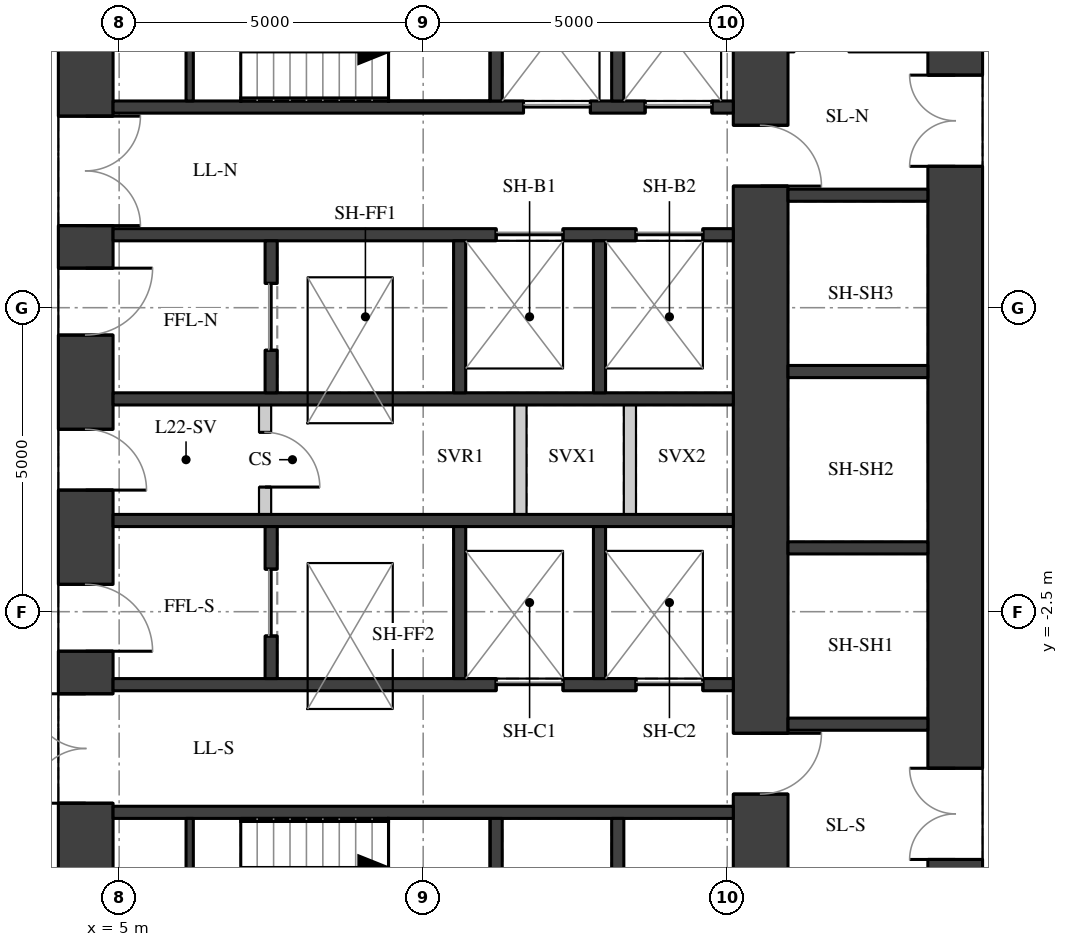
"""IFC4 building model, lengths in metres.
Left out: names, types, materials, properties, quantities, classifications, styles, units other than length and angle.
Written with IfcOpenShell. Run it as: python <this file> out.ifc"""

import sys

from ifc_helpers import new_model, si_unit, direction, frame, frame_2d, origin, place, context, subcontext, project, spatial, rectangle, extrude, element, fill, save


model = new_model("IFC4")
c1 = context("Model", 3, precision=1e-05, world=origin(), true_north=direction((0.0, 1.0)))
c2 = subcontext(c1, "Body", "Model", "MODEL_VIEW")
j1 = project(units=[si_unit("LENGTHUNIT", "METRE"), si_unit("PLANEANGLEUNIT", "RADIAN")], contexts=[c1])
p1 = place(None, origin())
s1 = spatial("IfcSite", under=j1, at=p1, CompositionType="ELEMENT")
p2 = place(p1, origin())
s2 = spatial("IfcBuilding", under=s1, at=p2, CompositionType="ELEMENT")
p3 = place(p2, frame((0.0, 0.0, 81.1)))
s3 = spatial("IfcBuildingStorey", under=s2, at=p3, CompositionType="ELEMENT", Elevation=81.1)
p4 = place(p3, frame((4.45, -11.1, 0.0), z_axis=(0.0, 0.0, 1.0), x_axis=(0.0, 1.0, 0.0)))
e1 = element("IfcWall", 1, at=p4, inside=s3, PredefinedType="SHEAR", context=c2, shape_type="SweptSolid", body=[
    extrude(rectangle(XDim=22.2, YDim=0.9, at=frame_2d((11.1, 0.0))), origin(), (0.0, 0.0, 1.0), 2.85),
])
p5 = place(p4, frame((2.35, 0.0, 0.0)))
e2 = element("IfcOpeningElement", 2, at=p5, cuts=e1, PredefinedType="OPENING", context=c2, shape_type="SweptSolid", body=[
    extrude(rectangle(XDim=1.5, YDim=2.1, at=frame_2d((0.75, 1.05))), frame((0.0, 0.46, 0.0), z_axis=(0.0, -1.0, 0.0), x_axis=(1.0, 0.0, 0.0)), (0.0, 0.0, 1.0), 0.92),
])
p6 = place(p4, frame((5.45, 0.0, 0.0)))
e3 = element("IfcOpeningElement", 3, at=p6, cuts=e1, PredefinedType="OPENING", context=c2, shape_type="SweptSolid", body=[
    extrude(rectangle(XDim=1.8, YDim=2.1, at=frame_2d((0.9, 1.05))), frame((0.0, 0.46, 0.0), z_axis=(0.0, -1.0, 0.0), x_axis=(1.0, 0.0, 0.0)), (0.0, 0.0, 1.0), 0.92),
])
p7 = place(p4, frame((7.95, 0.0, 0.0)))
e4 = element("IfcOpeningElement", 4, at=p7, cuts=e1, PredefinedType="OPENING", context=c2, shape_type="SweptSolid", body=[
    extrude(rectangle(XDim=1.1, YDim=2.1, at=frame_2d((0.55, 1.05))), frame((0.0, 0.46, 0.0), z_axis=(0.0, -1.0, 0.0), x_axis=(1.0, 0.0, 0.0)), (0.0, 0.0, 1.0), 0.92),
])
p8 = place(p4, frame((10.6, 0.0, 0.0)))
e5 = element("IfcOpeningElement", 5, at=p8, cuts=e1, PredefinedType="OPENING", context=c2, shape_type="SweptSolid", body=[
    extrude(rectangle(XDim=1.0, YDim=2.1, at=frame_2d((0.5, 1.05))), frame((0.0, 0.46, 0.0), z_axis=(0.0, -1.0, 0.0), x_axis=(1.0, 0.0, 0.0)), (0.0, 0.0, 1.0), 0.92),
])
p9 = place(p4, frame((13.15, 0.0, 0.0)))
e6 = element("IfcOpeningElement", 6, at=p9, cuts=e1, PredefinedType="OPENING", context=c2, shape_type="SweptSolid", body=[
    extrude(rectangle(XDim=1.1, YDim=2.1, at=frame_2d((0.55, 1.05))), frame((0.0, 0.46, 0.0), z_axis=(0.0, -1.0, 0.0), x_axis=(1.0, 0.0, 0.0)), (0.0, 0.0, 1.0), 0.92),
])
p10 = place(p4, frame((14.95, 0.0, 0.0)))
e7 = element("IfcOpeningElement", 7, at=p10, cuts=e1, PredefinedType="OPENING", context=c2, shape_type="SweptSolid", body=[
    extrude(rectangle(XDim=1.8, YDim=2.1, at=frame_2d((0.9, 1.05))), frame((0.0, 0.46, 0.0), z_axis=(0.0, -1.0, 0.0), x_axis=(1.0, 0.0, 0.0)), (0.0, 0.0, 1.0), 0.92),
])
p11 = place(p4, frame((18.35, 0.0, 0.0)))
e8 = element("IfcOpeningElement", 8, at=p11, cuts=e1, PredefinedType="OPENING", context=c2, shape_type="SweptSolid", body=[
    extrude(rectangle(XDim=1.5, YDim=2.1, at=frame_2d((0.75, 1.05))), frame((0.0, 0.46, 0.0), z_axis=(0.0, -1.0, 0.0), x_axis=(1.0, 0.0, 0.0)), (0.0, 0.0, 1.0), 0.92),
])
p12 = place(p3, frame((18.75, -11.1, 0.0), z_axis=(0.0, 0.0, 1.0), x_axis=(0.0, 1.0, 0.0)))
e9 = element("IfcWall", 9, at=p12, inside=s3, PredefinedType="SHEAR", context=c2, shape_type="SweptSolid", body=[
    extrude(rectangle(XDim=22.2, YDim=0.9, at=frame_2d((11.1, 0.0))), origin(), (0.0, 0.0, 1.0), 2.85),
])
p13 = place(p12, frame((15.925, 0.0, 0.0)))
e10 = element("IfcOpeningElement", 10, at=p13, cuts=e9, PredefinedType="OPENING", context=c2, shape_type="SweptSolid", body=[
    extrude(rectangle(XDim=1.5, YDim=2.1, at=frame_2d((0.75, 1.05))), frame((0.0, 0.46, 0.0), z_axis=(0.0, -1.0, 0.0), x_axis=(1.0, 0.0, 0.0)), (0.0, 0.0, 1.0), 0.92),
])
p14 = place(p12, frame((4.525, 0.0, 0.0)))
e11 = element("IfcOpeningElement", 11, at=p14, cuts=e9, PredefinedType="OPENING", context=c2, shape_type="SweptSolid", body=[
    extrude(rectangle(XDim=1.5, YDim=2.1, at=frame_2d((0.75, 1.05))), frame((0.0, 0.46, 0.0), z_axis=(0.0, -1.0, 0.0), x_axis=(1.0, 0.0, 0.0)), (0.0, 0.0, 1.0), 0.92),
])
p15 = place(p3, frame((15.55, -11.1, 0.0), z_axis=(0.0, 0.0, 1.0), x_axis=(0.0, 1.0, 0.0)))
e12 = element("IfcWall", 12, at=p15, inside=s3, PredefinedType="SHEAR", context=c2, shape_type="SweptSolid", body=[
    extrude(rectangle(XDim=22.2, YDim=0.9, at=frame_2d((11.1, 0.0))), origin(), (0.0, 0.0, 1.0), 2.85),
])
p16 = place(p15, frame((15.6, 0.0, 0.0)))
e13 = element("IfcOpeningElement", 13, at=p16, cuts=e12, PredefinedType="OPENING", context=c2, shape_type="SweptSolid", body=[
    extrude(rectangle(XDim=1.0, YDim=2.1, at=frame_2d((0.5, 1.05))), frame((0.0, 0.46, 0.0), z_axis=(0.0, -1.0, 0.0), x_axis=(1.0, 0.0, 0.0)), (0.0, 0.0, 1.0), 0.92),
])
p17 = place(p15, frame((5.6, 0.0, 0.0)))
e14 = element("IfcOpeningElement", 14, at=p17, cuts=e12, PredefinedType="OPENING", context=c2, shape_type="SweptSolid", body=[
    extrude(rectangle(XDim=1.0, YDim=2.1, at=frame_2d((0.5, 1.05))), frame((0.0, 0.46, 0.0), z_axis=(0.0, -1.0, 0.0), x_axis=(1.0, 0.0, 0.0)), (0.0, 0.0, 1.0), 0.92),
])
p18 = place(p3, frame((4.9, 5.8, 0.0), z_axis=(0.0, 0.0, 1.0), x_axis=(1.0, 0.0, 0.0)))
e15 = element("IfcWall", 15, at=p18, inside=s3, PredefinedType="SHEAR", context=c2, shape_type="SweptSolid", body=[
    extrude(rectangle(XDim=10.2, YDim=0.2, at=frame_2d((5.1, 0.0))), origin(), (0.0, 0.0, 1.0), 2.85),
])
p19 = place(p18, frame((6.75, 0.0, 0.0)))
e16 = element("IfcOpeningElement", 16, at=p19, cuts=e15, PredefinedType="OPENING", context=c2, shape_type="SweptSolid", body=[
    extrude(rectangle(XDim=1.1, YDim=2.1, at=frame_2d((0.55, 1.05))), frame((0.0, 0.11, 0.0), z_axis=(0.0, -1.0, 0.0), x_axis=(1.0, 0.0, 0.0)), (0.0, 0.0, 1.0), 0.22),
])
p20 = place(p18, frame((8.75, 0.0, 0.0)))
e17 = element("IfcOpeningElement", 17, at=p20, cuts=e15, PredefinedType="OPENING", context=c2, shape_type="SweptSolid", body=[
    extrude(rectangle(XDim=1.1, YDim=2.1, at=frame_2d((0.55, 1.05))), frame((0.0, 0.11, 0.0), z_axis=(0.0, -1.0, 0.0), x_axis=(1.0, 0.0, 0.0)), (0.0, 0.0, 1.0), 0.22),
])
p21 = place(p3, frame((4.9, 3.7, 0.0), z_axis=(0.0, 0.0, 1.0), x_axis=(1.0, 0.0, 0.0)))
e18 = element("IfcWall", 18, at=p21, inside=s3, PredefinedType="SHEAR", context=c2, shape_type="SweptSolid", body=[
    extrude(rectangle(XDim=10.2, YDim=0.2, at=frame_2d((5.1, 0.0))), origin(), (0.0, 0.0, 1.0), 2.85),
])
p22 = place(p21, frame((6.3, 0.0, 0.0)))
e19 = element("IfcOpeningElement", 19, at=p22, cuts=e18, PredefinedType="OPENING", context=c2, shape_type="SweptSolid", body=[
    extrude(rectangle(XDim=1.1, YDim=2.1, at=frame_2d((0.55, 1.05))), frame((0.0, 0.11, 0.0), z_axis=(0.0, -1.0, 0.0), x_axis=(1.0, 0.0, 0.0)), (0.0, 0.0, 1.0), 0.22),
])
p23 = place(p21, frame((8.6, 0.0, 0.0)))
e20 = element("IfcOpeningElement", 20, at=p23, cuts=e18, PredefinedType="OPENING", context=c2, shape_type="SweptSolid", body=[
    extrude(rectangle(XDim=1.1, YDim=2.1, at=frame_2d((0.55, 1.05))), frame((0.0, 0.11, 0.0), z_axis=(0.0, -1.0, 0.0), x_axis=(1.0, 0.0, 0.0)), (0.0, 0.0, 1.0), 0.22),
])
for number, where, z_axis, x_axis in (
    (21, (4.9, 1.0, 0.0), (0.0, 0.0, 1.0), (1.0, 0.0, 0.0)),
    (22, (4.9, -1.0, 0.0), (0.0, 0.0, 1.0), (1.0, 0.0, 0.0)),
):
    element("IfcWall", number, at=place(p3, frame(where, z_axis=z_axis, x_axis=x_axis)), inside=s3, PredefinedType="SHEAR", context=c2, shape_type="SweptSolid", body=[
        extrude(rectangle(XDim=10.2, YDim=0.2, at=frame_2d((5.1, 0.0))), origin(), (0.0, 0.0, 1.0), 2.85),
    ])
p24 = place(p3, frame((4.9, -3.7, 0.0), z_axis=(0.0, 0.0, 1.0), x_axis=(1.0, 0.0, 0.0)))
e23 = element("IfcWall", 23, at=p24, inside=s3, PredefinedType="SHEAR", context=c2, shape_type="SweptSolid", body=[
    extrude(rectangle(XDim=10.2, YDim=0.2, at=frame_2d((5.1, 0.0))), origin(), (0.0, 0.0, 1.0), 2.85),
])
p25 = place(p24, frame((6.3, 0.0, 0.0)))
e24 = element("IfcOpeningElement", 24, at=p25, cuts=e23, PredefinedType="OPENING", context=c2, shape_type="SweptSolid", body=[
    extrude(rectangle(XDim=1.1, YDim=2.1, at=frame_2d((0.55, 1.05))), frame((0.0, 0.11, 0.0), z_axis=(0.0, -1.0, 0.0), x_axis=(1.0, 0.0, 0.0)), (0.0, 0.0, 1.0), 0.22),
])
p26 = place(p24, frame((8.6, 0.0, 0.0)))
e25 = element("IfcOpeningElement", 25, at=p26, cuts=e23, PredefinedType="OPENING", context=c2, shape_type="SweptSolid", body=[
    extrude(rectangle(XDim=1.1, YDim=2.1, at=frame_2d((0.55, 1.05))), frame((0.0, 0.11, 0.0), z_axis=(0.0, -1.0, 0.0), x_axis=(1.0, 0.0, 0.0)), (0.0, 0.0, 1.0), 0.22),
])
p27 = place(p3, frame((4.9, -5.8, 0.0), z_axis=(0.0, 0.0, 1.0), x_axis=(1.0, 0.0, 0.0)))
e26 = element("IfcWall", 26, at=p27, inside=s3, PredefinedType="SHEAR", context=c2, shape_type="SweptSolid", body=[
    extrude(rectangle(XDim=10.2, YDim=0.2, at=frame_2d((5.1, 0.0))), origin(), (0.0, 0.0, 1.0), 2.85),
])
for number, where, z_axis, x_axis in (
    (27, (11.2, 5.9, 0.0), (0.0, 0.0, 1.0), (0.0, 1.0, 0.0)),
    (28, (11.2, -9.1, 0.0), (0.0, 0.0, 1.0), (0.0, 1.0, 0.0)),
    (29, (13.2, 5.9, 0.0), (0.0, 0.0, 1.0), (0.0, 1.0, 0.0)),
    (30, (13.2, -9.1, 0.0), (0.0, 0.0, 1.0), (0.0, 1.0, 0.0)),
):
    element("IfcWall", number, at=place(p3, frame(where, z_axis=z_axis, x_axis=x_axis)), inside=s3, PredefinedType="SHEAR", context=c2, shape_type="SweptSolid", body=[
        extrude(rectangle(XDim=3.2, YDim=0.2, at=frame_2d((1.6, 0.0))), origin(), (0.0, 0.0, 1.0), 2.85),
    ])
p28 = place(p3, frame((7.5, 1.1, 0.0), z_axis=(0.0, 0.0, 1.0), x_axis=(0.0, 1.0, 0.0)))
e31 = element("IfcWall", 31, at=p28, inside=s3, PredefinedType="SHEAR", context=c2, shape_type="SweptSolid", body=[
    extrude(rectangle(XDim=2.5, YDim=0.2, at=frame_2d((1.25, 0.0))), origin(), (0.0, 0.0, 1.0), 2.85),
])
p29 = place(p28, frame((0.7, 0.0, 0.0)))
e32 = element("IfcOpeningElement", 32, at=p29, cuts=e31, PredefinedType="OPENING", context=c2, shape_type="SweptSolid", body=[
    extrude(rectangle(XDim=1.1, YDim=2.1, at=frame_2d((0.55, 1.05))), frame((0.0, 0.11, 0.0), z_axis=(0.0, -1.0, 0.0), x_axis=(1.0, 0.0, 0.0)), (0.0, 0.0, 1.0), 0.22),
])
p30 = place(p3, frame((7.5, -3.6, 0.0), z_axis=(0.0, 0.0, 1.0), x_axis=(0.0, 1.0, 0.0)))
e33 = element("IfcWall", 33, at=p30, inside=s3, PredefinedType="SHEAR", context=c2, shape_type="SweptSolid", body=[
    extrude(rectangle(XDim=2.5, YDim=0.2, at=frame_2d((1.25, 0.0))), origin(), (0.0, 0.0, 1.0), 2.85),
])
p31 = place(p30, frame((0.7, 0.0, 0.0)))
e34 = element("IfcOpeningElement", 34, at=p31, cuts=e33, PredefinedType="OPENING", context=c2, shape_type="SweptSolid", body=[
    extrude(rectangle(XDim=1.1, YDim=2.1, at=frame_2d((0.55, 1.05))), frame((0.0, 0.11, 0.0), z_axis=(0.0, -1.0, 0.0), x_axis=(1.0, 0.0, 0.0)), (0.0, 0.0, 1.0), 0.22),
])
for number, where, z_axis, x_axis in (
    (35, (10.6, 1.1, 0.0), (0.0, 0.0, 1.0), (0.0, 1.0, 0.0)),
    (36, (10.6, -3.6, 0.0), (0.0, 0.0, 1.0), (0.0, 1.0, 0.0)),
    (37, (12.9, 1.1, 0.0), (0.0, 0.0, 1.0), (0.0, 1.0, 0.0)),
    (38, (12.9, -3.6, 0.0), (0.0, 0.0, 1.0), (0.0, 1.0, 0.0)),
):
    element("IfcWall", number, at=place(p3, frame(where, z_axis=z_axis, x_axis=x_axis)), inside=s3, PredefinedType="SHEAR", context=c2, shape_type="SweptSolid", body=[
        extrude(rectangle(XDim=2.5, YDim=0.2, at=frame_2d((1.25, 0.0))), origin(), (0.0, 0.0, 1.0), 2.85),
    ])
p32 = place(p3, frame((6.16, 5.9, 0.0), z_axis=(0.0, 0.0, 1.0), x_axis=(0.0, 1.0, 0.0)))
e39 = element("IfcWall", 39, at=p32, inside=s3, PredefinedType="SHEAR", context=c2, shape_type="SweptSolid", body=[
    extrude(rectangle(XDim=3.2, YDim=0.12, at=frame_2d((1.6, 0.0))), origin(), (0.0, 0.0, 1.0), 2.85),
])
p33 = place(p32, frame((0.85, 0.0, 0.0)))
e40 = element("IfcOpeningElement", 40, at=p33, cuts=e39, PredefinedType="OPENING", context=c2, shape_type="SweptSolid", body=[
    extrude(rectangle(XDim=1.5, YDim=2.1, at=frame_2d((0.75, 1.05))), frame((0.0, 0.07, 0.0), z_axis=(0.0, -1.0, 0.0), x_axis=(1.0, 0.0, 0.0)), (0.0, 0.0, 1.0), 0.14),
])
p34 = place(p3, frame((6.16, -9.1, 0.0), z_axis=(0.0, 0.0, 1.0), x_axis=(0.0, 1.0, 0.0)))
e41 = element("IfcWall", 41, at=p34, inside=s3, PredefinedType="SHEAR", context=c2, shape_type="SweptSolid", body=[
    extrude(rectangle(XDim=3.2, YDim=0.12, at=frame_2d((1.6, 0.0))), origin(), (0.0, 0.0, 1.0), 2.85),
])
p35 = place(p34, frame((0.85, 0.0, 0.0)))
e42 = element("IfcOpeningElement", 42, at=p35, cuts=e41, PredefinedType="OPENING", context=c2, shape_type="SweptSolid", body=[
    extrude(rectangle(XDim=1.5, YDim=2.1, at=frame_2d((0.75, 1.05))), frame((0.0, 0.07, 0.0), z_axis=(0.0, -1.0, 0.0), x_axis=(1.0, 0.0, 0.0)), (0.0, 0.0, 1.0), 0.14),
])
p36 = place(p3, frame((7.4, -0.9, 0.0), z_axis=(0.0, 0.0, 1.0), x_axis=(0.0, 1.0, 0.0)))
e43 = element("IfcWall", 43, at=p36, inside=s3, PredefinedType="PARTITIONING", context=c2, shape_type="SweptSolid", body=[
    extrude(rectangle(XDim=1.8, YDim=0.2, at=frame_2d((0.9, 0.0))), origin(), (0.0, 0.0, 1.0), 2.85),
])
p37 = place(p36, frame((0.45, 0.0, 0.0)))
e44 = element("IfcOpeningElement", 44, at=p37, cuts=e43, PredefinedType="OPENING", context=c2, shape_type="SweptSolid", body=[
    extrude(rectangle(XDim=0.9, YDim=2.1, at=frame_2d((0.45, 1.05))), frame((0.0, 0.11, 0.0), z_axis=(0.0, -1.0, 0.0), x_axis=(1.0, 0.0, 0.0)), (0.0, 0.0, 1.0), 0.22),
])
for number, where, z_axis, x_axis in (
    (45, (11.6, -0.9, 0.0), (0.0, 0.0, 1.0), (0.0, 1.0, 0.0)),
    (46, (13.4, -0.9, 0.0), (0.0, 0.0, 1.0), (0.0, 1.0, 0.0)),
):
    element("IfcWall", number, at=place(p3, frame(where, z_axis=z_axis, x_axis=x_axis)), inside=s3, PredefinedType="PARTITIONING", context=c2, shape_type="SweptSolid", body=[
        extrude(rectangle(XDim=1.8, YDim=0.2, at=frame_2d((0.9, 0.0))), origin(), (0.0, 0.0, 1.0), 2.85),
    ])
for number, where, z_axis, x_axis in (
    (47, (16.0, -4.35, 0.0), (0.0, 0.0, 1.0), (1.0, 0.0, 0.0)),
    (48, (16.0, -1.45, 0.0), (0.0, 0.0, 1.0), (1.0, 0.0, 0.0)),
    (49, (16.0, 1.45, 0.0), (0.0, 0.0, 1.0), (1.0, 0.0, 0.0)),
    (50, (16.0, 4.35, 0.0), (0.0, 0.0, 1.0), (1.0, 0.0, 0.0)),
):
    element("IfcWall", number, at=place(p3, frame(where, z_axis=z_axis, x_axis=x_axis)), inside=s3, PredefinedType="SHEAR", context=c2, shape_type="SweptSolid", body=[
        extrude(rectangle(XDim=2.3, YDim=0.2, at=frame_2d((1.15, 0.0))), origin(), (0.0, 0.0, 1.0), 2.85),
    ])
p38 = place(p6, origin())
e51 = element("IfcDoor", 51, at=p38, inside=s3, OperationType="DOUBLE_DOOR_SINGLE_SWING", PredefinedType="DOOR", context=c2, shape_type="SweptSolid", body=[
    extrude(rectangle(XDim=1.8, YDim=2.1, at=frame_2d((0.9, 1.05))), frame((0.0, 0.025, 0.0), z_axis=(0.0, -1.0, 0.0), x_axis=(1.0, 0.0, 0.0)), (0.0, 0.0, 1.0), 0.05),
])
fill(e3, e51)
p39 = place(p7, origin())
e52 = element("IfcDoor", 52, at=p39, inside=s3, OperationType="SINGLE_SWING_RIGHT", PredefinedType="DOOR", context=c2, shape_type="SweptSolid", body=[
    extrude(rectangle(XDim=1.1, YDim=2.1, at=frame_2d((0.55, 1.05))), frame((0.0, 0.025, 0.0), z_axis=(0.0, -1.0, 0.0), x_axis=(1.0, 0.0, 0.0)), (0.0, 0.0, 1.0), 0.05),
])
fill(e4, e52)
p40 = place(p8, origin())
e53 = element("IfcDoor", 53, at=p40, inside=s3, OperationType="SINGLE_SWING_RIGHT", PredefinedType="DOOR", context=c2, shape_type="SweptSolid", body=[
    extrude(rectangle(XDim=1.0, YDim=2.1, at=frame_2d((0.5, 1.05))), frame((0.0, 0.025, 0.0), z_axis=(0.0, -1.0, 0.0), x_axis=(1.0, 0.0, 0.0)), (0.0, 0.0, 1.0), 0.05),
])
fill(e5, e53)
p41 = place(p9, origin())
e54 = element("IfcDoor", 54, at=p41, inside=s3, OperationType="SINGLE_SWING_LEFT", PredefinedType="DOOR", context=c2, shape_type="SweptSolid", body=[
    extrude(rectangle(XDim=1.1, YDim=2.1, at=frame_2d((0.55, 1.05))), frame((0.0, 0.025, 0.0), z_axis=(0.0, -1.0, 0.0), x_axis=(1.0, 0.0, 0.0)), (0.0, 0.0, 1.0), 0.05),
])
fill(e6, e54)
p42 = place(p10, origin())
e55 = element("IfcDoor", 55, at=p42, inside=s3, OperationType="DOUBLE_DOOR_SINGLE_SWING", PredefinedType="DOOR", context=c2, shape_type="SweptSolid", body=[
    extrude(rectangle(XDim=1.8, YDim=2.1, at=frame_2d((0.9, 1.05))), frame((0.0, 0.025, 0.0), z_axis=(0.0, -1.0, 0.0), x_axis=(1.0, 0.0, 0.0)), (0.0, 0.0, 1.0), 0.05),
])
fill(e7, e55)
p43 = place(p13, origin())
e56 = element("IfcDoor", 56, at=p43, inside=s3, OperationType="DOUBLE_DOOR_SINGLE_SWING", PredefinedType="DOOR", context=c2, shape_type="SweptSolid", body=[
    extrude(rectangle(XDim=1.5, YDim=2.1, at=frame_2d((0.75, 1.05))), frame((0.0, 0.025, 0.0), z_axis=(0.0, -1.0, 0.0), x_axis=(1.0, 0.0, 0.0)), (0.0, 0.0, 1.0), 0.05),
])
fill(e10, e56)
p44 = place(p14, origin())
e57 = element("IfcDoor", 57, at=p44, inside=s3, OperationType="DOUBLE_DOOR_SINGLE_SWING", PredefinedType="DOOR", context=c2, shape_type="SweptSolid", body=[
    extrude(rectangle(XDim=1.5, YDim=2.1, at=frame_2d((0.75, 1.05))), frame((0.0, 0.025, 0.0), z_axis=(0.0, -1.0, 0.0), x_axis=(1.0, 0.0, 0.0)), (0.0, 0.0, 1.0), 0.05),
])
fill(e11, e57)
p45 = place(p19, origin())
e58 = element("IfcDoor", 58, at=p45, inside=s3, OperationType="DOUBLE_DOOR_SLIDING", PredefinedType="DOOR", context=c2, shape_type="SweptSolid", body=[
    extrude(rectangle(XDim=1.1, YDim=2.1, at=frame_2d((0.55, 1.05))), frame((0.0, 0.025, 0.0), z_axis=(0.0, -1.0, 0.0), x_axis=(1.0, 0.0, 0.0)), (0.0, 0.0, 1.0), 0.05),
])
fill(e16, e58)
p46 = place(p20, origin())
e59 = element("IfcDoor", 59, at=p46, inside=s3, OperationType="DOUBLE_DOOR_SLIDING", PredefinedType="DOOR", context=c2, shape_type="SweptSolid", body=[
    extrude(rectangle(XDim=1.1, YDim=2.1, at=frame_2d((0.55, 1.05))), frame((0.0, 0.025, 0.0), z_axis=(0.0, -1.0, 0.0), x_axis=(1.0, 0.0, 0.0)), (0.0, 0.0, 1.0), 0.05),
])
fill(e17, e59)
p47 = place(p22, origin())
e60 = element("IfcDoor", 60, at=p47, inside=s3, OperationType="DOUBLE_DOOR_SLIDING", PredefinedType="DOOR", context=c2, shape_type="SweptSolid", body=[
    extrude(rectangle(XDim=1.1, YDim=2.1, at=frame_2d((0.55, 1.05))), frame((0.0, 0.025, 0.0), z_axis=(0.0, -1.0, 0.0), x_axis=(1.0, 0.0, 0.0)), (0.0, 0.0, 1.0), 0.05),
])
fill(e19, e60)
p48 = place(p23, origin())
e61 = element("IfcDoor", 61, at=p48, inside=s3, OperationType="DOUBLE_DOOR_SLIDING", PredefinedType="DOOR", context=c2, shape_type="SweptSolid", body=[
    extrude(rectangle(XDim=1.1, YDim=2.1, at=frame_2d((0.55, 1.05))), frame((0.0, 0.025, 0.0), z_axis=(0.0, -1.0, 0.0), x_axis=(1.0, 0.0, 0.0)), (0.0, 0.0, 1.0), 0.05),
])
fill(e20, e61)
p49 = place(p25, origin())
e62 = element("IfcDoor", 62, at=p49, inside=s3, OperationType="DOUBLE_DOOR_SLIDING", PredefinedType="DOOR", context=c2, shape_type="SweptSolid", body=[
    extrude(rectangle(XDim=1.1, YDim=2.1, at=frame_2d((0.55, 1.05))), frame((0.0, 0.025, 0.0), z_axis=(0.0, -1.0, 0.0), x_axis=(1.0, 0.0, 0.0)), (0.0, 0.0, 1.0), 0.05),
])
fill(e24, e62)
p50 = place(p26, origin())
e63 = element("IfcDoor", 63, at=p50, inside=s3, OperationType="DOUBLE_DOOR_SLIDING", PredefinedType="DOOR", context=c2, shape_type="SweptSolid", body=[
    extrude(rectangle(XDim=1.1, YDim=2.1, at=frame_2d((0.55, 1.05))), frame((0.0, 0.025, 0.0), z_axis=(0.0, -1.0, 0.0), x_axis=(1.0, 0.0, 0.0)), (0.0, 0.0, 1.0), 0.05),
])
fill(e25, e63)
p51 = place(p29, origin())
e64 = element("IfcDoor", 64, at=p51, inside=s3, OperationType="DOUBLE_DOOR_SLIDING", PredefinedType="DOOR", context=c2, shape_type="SweptSolid", body=[
    extrude(rectangle(XDim=1.1, YDim=2.1, at=frame_2d((0.55, 1.05))), frame((0.0, 0.025, 0.0), z_axis=(0.0, -1.0, 0.0), x_axis=(1.0, 0.0, 0.0)), (0.0, 0.0, 1.0), 0.05),
])
fill(e32, e64)
p52 = place(p31, origin())
e65 = element("IfcDoor", 65, at=p52, inside=s3, OperationType="DOUBLE_DOOR_SLIDING", PredefinedType="DOOR", context=c2, shape_type="SweptSolid", body=[
    extrude(rectangle(XDim=1.1, YDim=2.1, at=frame_2d((0.55, 1.05))), frame((0.0, 0.025, 0.0), z_axis=(0.0, -1.0, 0.0), x_axis=(1.0, 0.0, 0.0)), (0.0, 0.0, 1.0), 0.05),
])
fill(e34, e65)
p53 = place(p37, origin())
e66 = element("IfcDoor", 66, at=p53, inside=s3, OperationType="SINGLE_SWING_RIGHT", PredefinedType="DOOR", context=c2, shape_type="SweptSolid", body=[
    extrude(rectangle(XDim=0.9, YDim=2.1, at=frame_2d((0.45, 1.05))), frame((0.0, 0.025, 0.0), z_axis=(0.0, -1.0, 0.0), x_axis=(1.0, 0.0, 0.0)), (0.0, 0.0, 1.0), 0.05),
])
fill(e44, e66)
p54 = place(p16, origin())
e67 = element("IfcDoor", 67, at=p54, inside=s3, OperationType="SINGLE_SWING_RIGHT", PredefinedType="DOOR", context=c2, shape_type="SweptSolid", body=[
    extrude(rectangle(XDim=1.0, YDim=2.1, at=frame_2d((0.5, 1.05))), frame((0.0, 0.025, 0.0), z_axis=(0.0, -1.0, 0.0), x_axis=(1.0, 0.0, 0.0)), (0.0, 0.0, 1.0), 0.05),
])
fill(e13, e67)
p55 = place(p17, origin())
e68 = element("IfcDoor", 68, at=p55, inside=s3, OperationType="SINGLE_SWING_LEFT", PredefinedType="DOOR", context=c2, shape_type="SweptSolid", body=[
    extrude(rectangle(XDim=1.0, YDim=2.1, at=frame_2d((0.5, 1.05))), frame((0.0, 0.025, 0.0), z_axis=(0.0, -1.0, 0.0), x_axis=(1.0, 0.0, 0.0)), (0.0, 0.0, 1.0), 0.05),
])
fill(e14, e68)
save(model, sys.argv[1])
